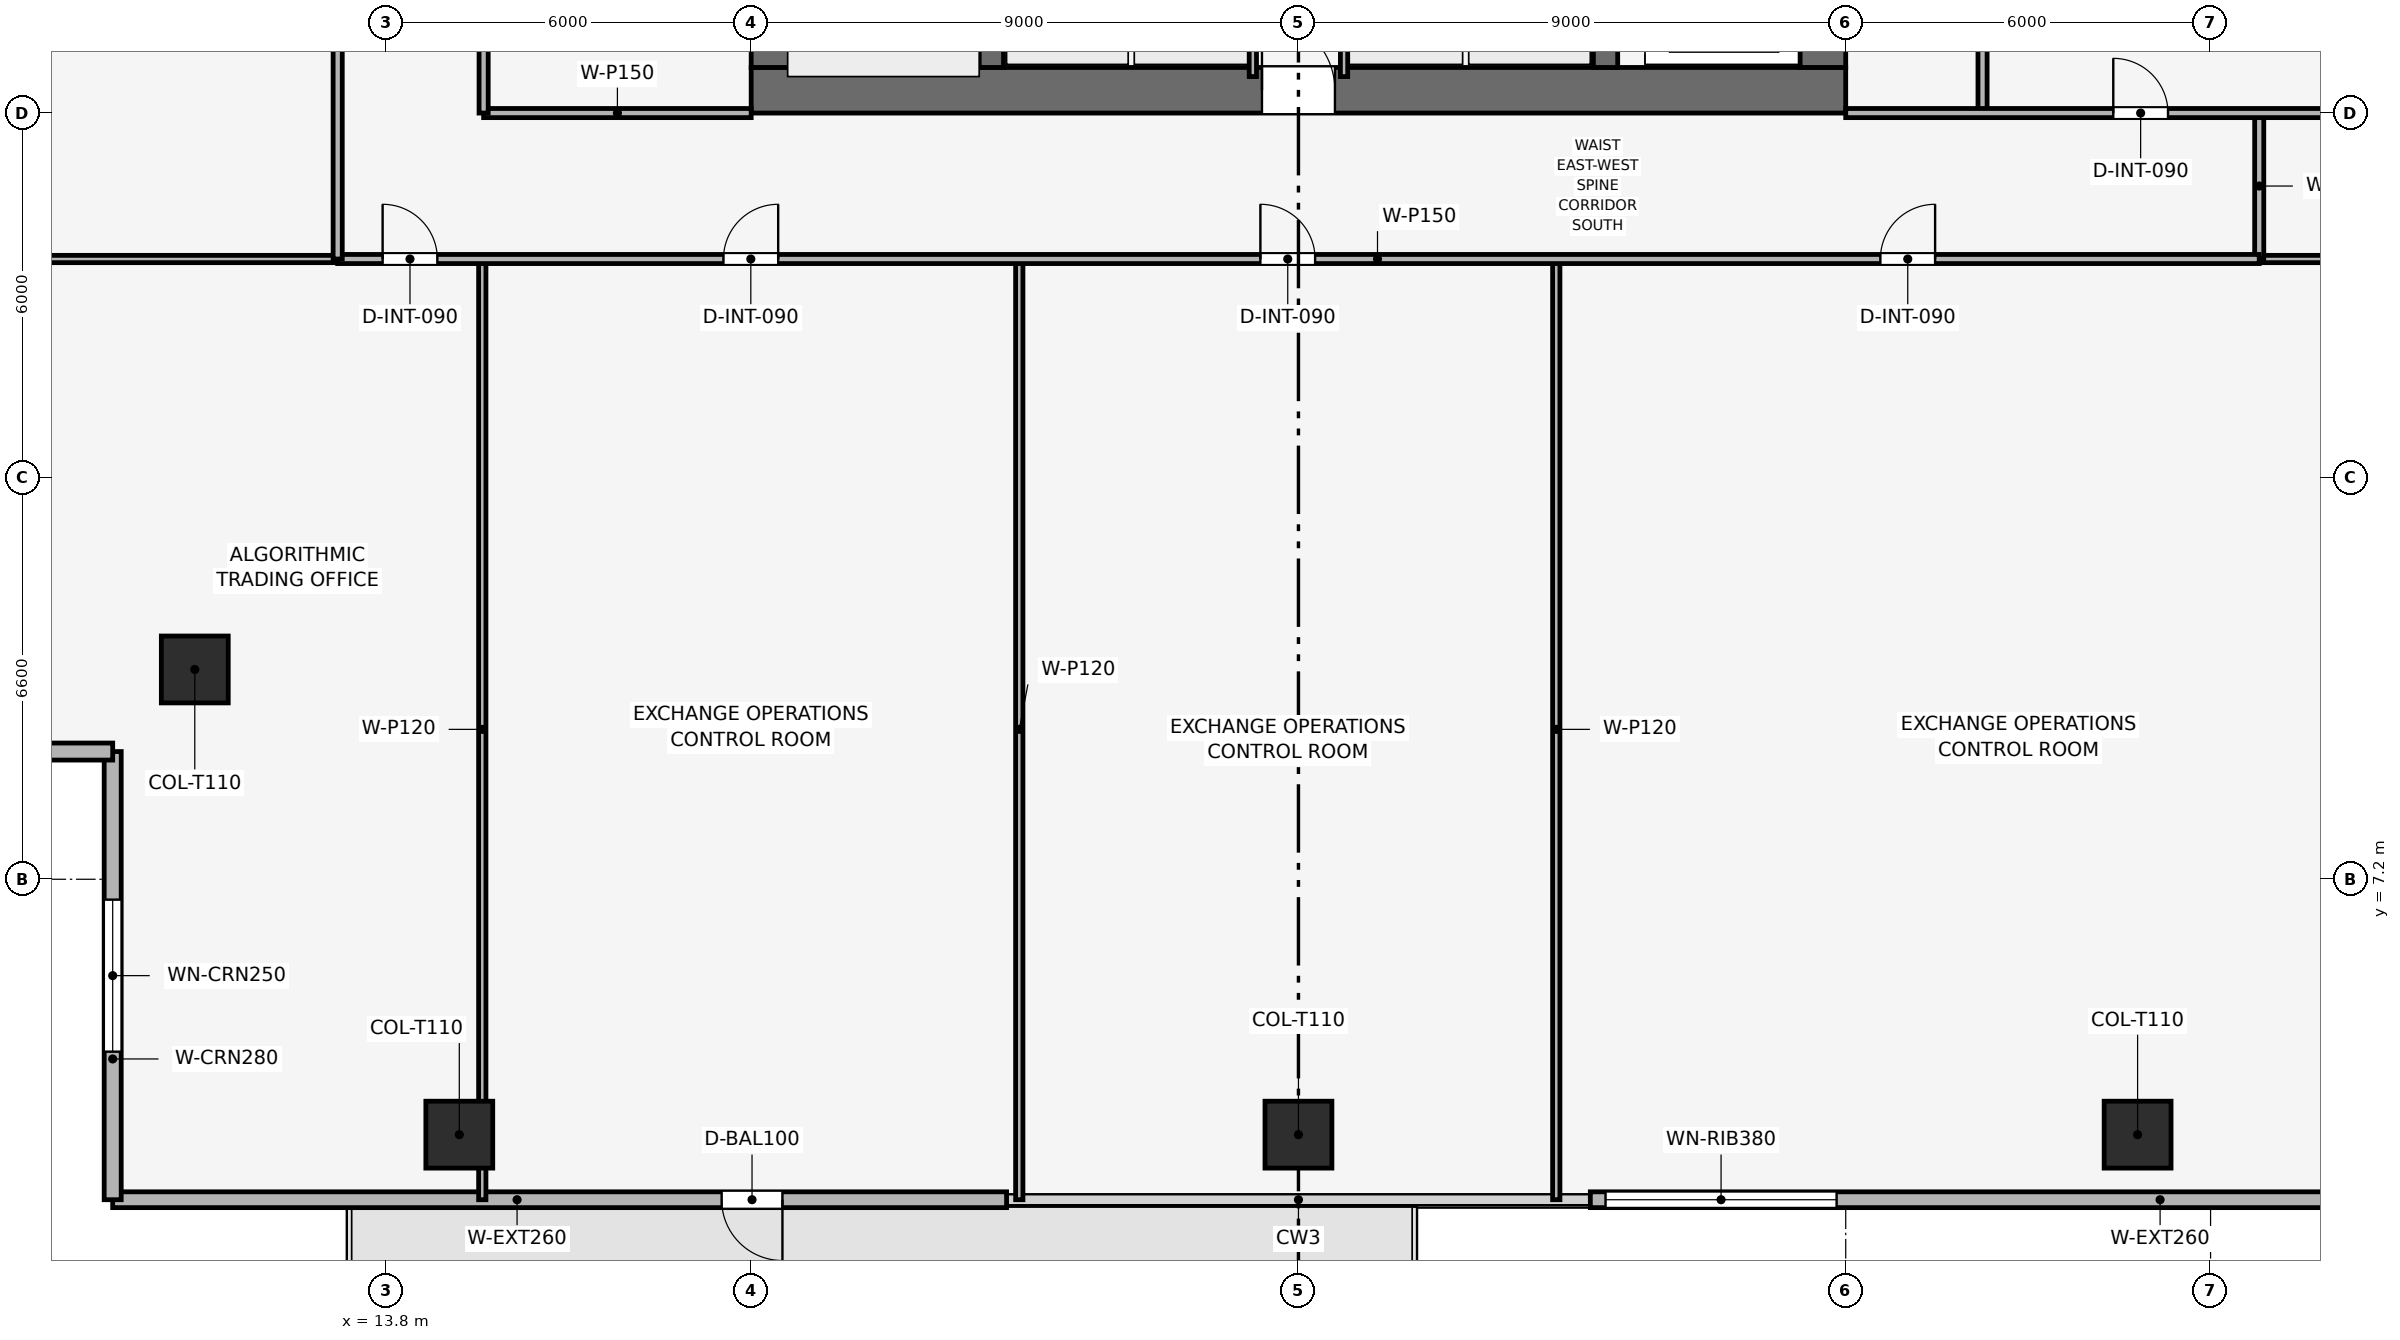
"""IFC4 building model, lengths in metres.
Left out: names, types, materials, properties, quantities, classifications, styles, units other than length and angle.
Written with IfcOpenShell. Run it as: python <this file> out.ifc"""

import sys

from ifc_helpers import new_model, si_unit, direction, frame, frame_2d, origin, origin_2d, place, context, subcontext, project, spatial, rectangle, extrude, element, fill, save


model = new_model("IFC4")
c1 = context("Model", 3, precision=1e-05, world=origin(), true_north=direction((0.0, 1.0)))
c2 = subcontext(c1, "Body", "Model", "MODEL_VIEW")
j1 = project(units=[si_unit("LENGTHUNIT", "METRE"), si_unit("PLANEANGLEUNIT", "RADIAN")], contexts=[c1])
p1 = place(None, origin())
s1 = spatial("IfcSite", under=j1, at=p1, CompositionType="ELEMENT")
p2 = place(p1, origin())
s2 = spatial("IfcBuilding", under=s1, at=p2, CompositionType="ELEMENT")
p3 = place(p2, frame((0.0, 0.0, 218.7)))
s3 = spatial("IfcBuildingStorey", under=s2, at=p3, CompositionType="ELEMENT", Elevation=218.7)
p4 = place(p3, frame((19.8, 20.175, 0.0), z_axis=(0.0, 0.0, 1.0), x_axis=(1.0, 0.0, 0.0)))
e1 = element("IfcWall", 1, at=p4, inside=s3, PredefinedType="SHEAR", context=c2, shape_type="SweptSolid", body=[
    extrude(rectangle(XDim=18.0, YDim=0.75, at=frame_2d((9.0, 0.0))), origin(), (0.0, 0.0, 1.0), 3.75),
])
p5 = place(p4, frame((8.4, 0.0, 0.0)))
e2 = element("IfcOpeningElement", 2, at=p5, cuts=e1, PredefinedType="OPENING", context=c2, shape_type="SweptSolid", body=[
    extrude(rectangle(XDim=1.2, YDim=2.2, at=frame_2d((0.6, 1.1))), frame((0.0, 0.385, 0.0), z_axis=(0.0, -1.0, 0.0), x_axis=(1.0, 0.0, 0.0)), (0.0, 0.0, 1.0), 0.77),
])
p6 = place(p3, frame((20.175, 20.55, 0.0), z_axis=(0.0, 0.0, 1.0), x_axis=(0.0, 1.0, 0.0)))
e3 = element("IfcWall", 3, at=p6, inside=s3, PredefinedType="SHEAR", context=c2, shape_type="SweptSolid", body=[
    extrude(rectangle(XDim=16.5, YDim=0.75, at=frame_2d((8.25, 0.0))), origin(), (0.0, 0.0, 1.0), 3.75),
])
p7 = place(p6, frame((10.25, 0.0, 0.0)))
e4 = element("IfcOpeningElement", 4, at=p7, cuts=e3, PredefinedType="OPENING", context=c2, shape_type="SweptSolid", body=[
    extrude(rectangle(XDim=1.1, YDim=2.15, at=frame_2d((0.55, 1.075))), frame((0.0, 0.385, 0.0), z_axis=(0.0, -1.0, 0.0), x_axis=(1.0, 0.0, 0.0)), (0.0, 0.0, 1.0), 0.77),
])
p8 = place(p3, frame((37.425, 20.55, 0.0), z_axis=(0.0, 0.0, 1.0), x_axis=(0.0, 1.0, 0.0)))
e5 = element("IfcWall", 5, at=p8, inside=s3, PredefinedType="SHEAR", context=c2, shape_type="SweptSolid", body=[
    extrude(rectangle(XDim=16.5, YDim=0.75, at=frame_2d((8.25, 0.0))), origin(), (0.0, 0.0, 1.0), 3.75),
])
p9 = place(p8, frame((4.75, 0.0, 0.0)))
e6 = element("IfcOpeningElement", 6, at=p9, cuts=e5, PredefinedType="OPENING", context=c2, shape_type="SweptSolid", body=[
    extrude(rectangle(XDim=1.1, YDim=2.15, at=frame_2d((0.55, 1.075))), frame((0.0, 0.385, 0.0), z_axis=(0.0, -1.0, 0.0), x_axis=(1.0, 0.0, 0.0)), (0.0, 0.0, 1.0), 0.77),
])
for number, where, z_axis, x_axis in (
    (7, (23.75, 20.55, 0.0), (0.0, 0.0, 1.0), (0.0, 1.0, 0.0)),
    (8, (33.85, 20.55, 0.0), (0.0, 0.0, 1.0), (0.0, 1.0, 0.0)),
):
    element("IfcWall", number, at=place(p3, frame(where, z_axis=z_axis, x_axis=x_axis)), inside=s3, PredefinedType="SHEAR", context=c2, shape_type="SweptSolid", body=[
        extrude(rectangle(XDim=16.5, YDim=0.4, at=frame_2d((8.25, 0.0))), origin(), (0.0, 0.0, 1.0), 3.75),
    ])
for number, where, z_axis, x_axis in (
    (9, (15.0, 3.0, 0.003), (0.0, 0.0, 1.0), (1.0, 0.0, 0.0)),
    (10, (28.8, 3.0, 0.003), (0.0, 0.0, 1.0), (1.0, 0.0, 0.0)),
    (11, (42.6, 3.0, 0.003), (0.0, 0.0, 1.0), (1.0, 0.0, 0.0)),
    (12, (10.65, 10.65, 0.003), (0.0, 0.0, 1.0), (1.0, 0.0, 0.0)),
):
    element("IfcColumn", number, at=place(p3, frame(where, z_axis=z_axis, x_axis=x_axis)), inside=s3, PredefinedType="COLUMN", context=c2, shape_type="SweptSolid", body=[
        extrude(rectangle(XDim=1.1, YDim=1.1, at=origin_2d()), origin(), (0.0, 0.0, 1.0), 3.494),
    ])
p10 = place(p3, frame((48.3, 1.93, 0.0), z_axis=(0.0, 0.0, 1.0), x_axis=(-1.0, 0.0, 0.0)))
e13 = element("IfcWall", 13, at=p10, inside=s3, PredefinedType="SOLIDWALL", context=c2, shape_type="SweptSolid", body=[
    extrude(rectangle(XDim=14.7, YDim=0.26, at=frame_2d((7.35, 0.0))), origin(), (0.0, 0.0, 1.0), 3.5),
])
p11 = place(p10, frame((10.65, 0.0, 0.9)))
e14 = element("IfcOpeningElement", 14, at=p11, cuts=e13, PredefinedType="OPENING", context=c2, shape_type="SweptSolid", body=[
    extrude(rectangle(XDim=3.8, YDim=1.9, at=frame_2d((1.9, 0.95))), frame((0.0, 0.14, 0.0), z_axis=(0.0, -1.0, 0.0), x_axis=(1.0, 0.0, 0.0)), (0.0, 0.0, 1.0), 0.28),
])
p12 = place(p3, frame((24.0, 1.93, 0.0), z_axis=(0.0, 0.0, 1.0), x_axis=(-1.0, 0.0, 0.0)))
e15 = element("IfcWall", 15, at=p12, inside=s3, PredefinedType="SOLIDWALL", context=c2, shape_type="SweptSolid", body=[
    extrude(rectangle(XDim=14.7, YDim=0.26, at=frame_2d((7.35, 0.0))), origin(), (0.0, 0.0, 1.0), 3.5),
])
p13 = place(p12, frame((3.686, 0.0, 0.0)))
e16 = element("IfcOpeningElement", 16, at=p13, cuts=e15, PredefinedType="OPENING", context=c2, shape_type="SweptSolid", body=[
    extrude(rectangle(XDim=1.0, YDim=2.2, at=frame_2d((0.5, 1.1))), frame((0.0, 0.14, 0.0), z_axis=(0.0, -1.0, 0.0), x_axis=(1.0, 0.0, 0.0)), (0.0, 0.0, 1.0), 0.28),
])
p14 = place(p3, frame((9.3, 1.93, 0.0), z_axis=(0.0, 0.0, 1.0), x_axis=(0.0, 1.0, 0.0)))
e17 = element("IfcWall", 17, at=p14, inside=s3, PredefinedType="SOLIDWALL", context=c2, shape_type="SweptSolid", body=[
    extrude(rectangle(XDim=7.37, YDim=0.28, at=frame_2d((3.685, 0.0))), origin(), (0.0, 0.0, 1.0), 3.5),
])
p15 = place(p14, frame((2.435, 0.0, 0.9)))
e18 = element("IfcOpeningElement", 18, at=p15, cuts=e17, PredefinedType="OPENING", context=c2, shape_type="SweptSolid", body=[
    extrude(rectangle(XDim=2.5, YDim=1.9, at=frame_2d((1.25, 0.95))), frame((0.0, 0.15, 0.0), z_axis=(0.0, -1.0, 0.0), x_axis=(1.0, 0.0, 0.0)), (0.0, 0.0, 1.0), 0.3),
])
p16 = place(p3, frame((9.3, 9.3, 0.0), z_axis=(0.0, 0.0, 1.0), x_axis=(-1.0, 0.0, 0.0)))
e19 = element("IfcWall", 19, at=p16, inside=s3, PredefinedType="SOLIDWALL", context=c2, shape_type="SweptSolid", body=[
    extrude(rectangle(XDim=7.37, YDim=0.28, at=frame_2d((3.685, 0.0))), origin(), (0.0, 0.0, 1.0), 3.5),
])
p17 = place(p16, frame((2.435, 0.0, 0.9)))
e20 = element("IfcOpeningElement", 20, at=p17, cuts=e19, PredefinedType="OPENING", context=c2, shape_type="SweptSolid", body=[
    extrude(rectangle(XDim=2.5, YDim=1.9, at=frame_2d((1.25, 0.95))), frame((0.0, 0.15, 0.0), z_axis=(0.0, -1.0, 0.0), x_axis=(1.0, 0.0, 0.0)), (0.0, 0.0, 1.0), 0.3),
])
for number, where, z_axis, x_axis in (
    (21, (28.05, 20.4, 0.0), (0.0, 0.0, 1.0), (0.0, 1.0, 0.0)),
    (22, (29.55, 20.4, 0.0), (0.0, 0.0, 1.0), (0.0, 1.0, 0.0)),
):
    element("IfcWall", number, at=place(p3, frame(where, z_axis=z_axis, x_axis=x_axis)), inside=s3, PredefinedType="PARTITIONING", context=c2, shape_type="SweptSolid", body=[
        extrude(rectangle(XDim=2.75, YDim=0.12, at=frame_2d((1.375, 0.0))), origin(), (0.0, 0.0, 1.0), 3.5),
    ])
p18 = place(p3, frame((15.4, 19.8, 0.0), z_axis=(0.0, 0.0, 1.0), x_axis=(1.0, 0.0, 0.0)))
e23 = element("IfcWall", 23, at=p18, inside=s3, PredefinedType="PARTITIONING", context=c2, shape_type="SweptSolid", body=[
    extrude(rectangle(XDim=4.4, YDim=0.15, at=frame_2d((2.2, 0.0))), origin(), (0.0, 0.0, 1.0), 3.035),
])
p19 = place(p3, frame((15.4, 19.8, 0.0), z_axis=(0.0, 0.0, 1.0), x_axis=(0.0, 1.0, 0.0)))
e24 = element("IfcWall", 24, at=p19, inside=s3, PredefinedType="PARTITIONING", context=c2, shape_type="SweptSolid", body=[
    extrude(rectangle(XDim=10.35, YDim=0.15, at=frame_2d((5.175, 0.0))), origin(), (0.0, 0.0, 1.0), 3.035),
])
p20 = place(p19, frame((1.2, 0.0, 0.0)))
e25 = element("IfcOpeningElement", 25, at=p20, cuts=e24, PredefinedType="OPENING", context=c2, shape_type="SweptSolid", body=[
    extrude(rectangle(XDim=0.9, YDim=2.1, at=frame_2d((0.45, 1.05))), frame((0.0, 0.085, 0.0), z_axis=(0.0, -1.0, 0.0), x_axis=(1.0, 0.0, 0.0)), (0.0, 0.0, 1.0), 0.17),
])
p21 = place(p19, frame((4.7, 0.0, 0.0)))
e26 = element("IfcOpeningElement", 26, at=p21, cuts=e24, PredefinedType="OPENING", context=c2, shape_type="SweptSolid", body=[
    extrude(rectangle(XDim=0.9, YDim=2.1, at=frame_2d((0.45, 1.05))), frame((0.0, 0.085, 0.0), z_axis=(0.0, -1.0, 0.0), x_axis=(1.0, 0.0, 0.0)), (0.0, 0.0, 1.0), 0.17),
])
p22 = place(p19, frame((8.1, 0.0, 0.0)))
e27 = element("IfcOpeningElement", 27, at=p22, cuts=e24, PredefinedType="OPENING", context=c2, shape_type="SweptSolid", body=[
    extrude(rectangle(XDim=0.95, YDim=2.1, at=frame_2d((0.475, 1.05))), frame((0.0, 0.085, 0.0), z_axis=(0.0, -1.0, 0.0), x_axis=(1.0, 0.0, 0.0)), (0.0, 0.0, 1.0), 0.17),
])
p23 = place(p3, frame((40.05, 19.8, 0.0), z_axis=(0.0, 0.0, 1.0), x_axis=(0.0, 1.0, 0.0)))
e28 = element("IfcWall", 28, at=p23, inside=s3, PredefinedType="PARTITIONING", context=c2, shape_type="SweptSolid", body=[
    extrude(rectangle(XDim=7.05, YDim=0.15, at=frame_2d((3.525, 0.0))), origin(), (0.0, 0.0, 1.0), 3.035),
])
for number, where, z_axis, x_axis in (
    (29, (15.378, 1.93, 0.0), (0.0, 0.0, 1.0), (0.0, 1.0, 0.0)),
    (30, (24.209, 1.93, 0.0), (0.0, 0.0, 1.0), (0.0, 1.0, 0.0)),
    (31, (33.04, 1.93, 0.0), (0.0, 0.0, 1.0), (0.0, 1.0, 0.0)),
):
    element("IfcWall", number, at=place(p3, frame(where, z_axis=z_axis, x_axis=x_axis)), inside=s3, PredefinedType="PARTITIONING", context=c2, shape_type="SweptSolid", body=[
        extrude(rectangle(XDim=15.47, YDim=0.12, at=frame_2d((7.735, 0.0))), origin(), (0.0, 0.0, 1.0), 2.885),
    ])
p24 = place(p3, frame((1.93, 17.4, 0.0), z_axis=(0.0, 0.0, 1.0), x_axis=(1.0, 0.0, 0.0)))
e32 = element("IfcWall", 32, at=p24, inside=s3, PredefinedType="PARTITIONING", context=c2, shape_type="SweptSolid", body=[
    extrude(rectangle(XDim=11.07, YDim=0.12, at=frame_2d((5.535, 0.0))), origin(), (0.0, 0.0, 1.0), 2.885),
])
p25 = place(p3, frame((44.6, 17.4, 0.0), z_axis=(0.0, 0.0, 1.0), x_axis=(1.0, 0.0, 0.0)))
e33 = element("IfcWall", 33, at=p25, inside=s3, PredefinedType="PARTITIONING", context=c2, shape_type="SweptSolid", body=[
    extrude(rectangle(XDim=11.07, YDim=0.12, at=frame_2d((5.535, 0.0))), origin(), (0.0, 0.0, 1.0), 2.885),
])
p26 = place(p3, frame((44.6, 17.4, 0.0), z_axis=(0.0, 0.0, 1.0), x_axis=(0.0, 1.0, 0.0)))
e34 = element("IfcWall", 34, at=p26, inside=s3, PredefinedType="PARTITIONING", context=c2, shape_type="SweptSolid", body=[
    extrude(rectangle(XDim=2.4, YDim=0.15, at=frame_2d((1.2, 0.0))), origin(), (0.0, 0.0, 1.0), 3.5),
])
p27 = place(p3, frame((37.8, 19.8, 0.0), z_axis=(0.0, 0.0, 1.0), x_axis=(1.0, 0.0, 0.0)))
e35 = element("IfcWall", 35, at=p27, inside=s3, PredefinedType="PARTITIONING", context=c2, shape_type="SweptSolid", body=[
    extrude(rectangle(XDim=17.87, YDim=0.15, at=frame_2d((8.935, 0.0))), origin(), (0.0, 0.0, 1.0), 2.885),
])
p28 = place(p27, frame((4.4, 0.0, 0.0)))
e36 = element("IfcOpeningElement", 36, at=p28, cuts=e35, PredefinedType="OPENING", context=c2, shape_type="SweptSolid", body=[
    extrude(rectangle(XDim=0.9, YDim=2.1, at=frame_2d((0.45, 1.05))), frame((0.0, 0.085, 0.0), z_axis=(0.0, -1.0, 0.0), x_axis=(1.0, 0.0, 0.0)), (0.0, 0.0, 1.0), 0.17),
])
p29 = place(p3, frame((13.0, 17.4, 0.0), z_axis=(0.0, 0.0, 1.0), x_axis=(1.0, 0.0, 0.0)))
e37 = element("IfcWall", 37, at=p29, inside=s3, PredefinedType="PARTITIONING", context=c2, shape_type="SweptSolid", body=[
    extrude(rectangle(XDim=31.6, YDim=0.15, at=frame_2d((15.8, 0.0))), origin(), (0.0, 0.0, 1.0), 3.035),
])
p30 = place(p29, frame((0.739, 0.0, 0.0)))
e38 = element("IfcOpeningElement", 38, at=p30, cuts=e37, PredefinedType="OPENING", context=c2, shape_type="SweptSolid", body=[
    extrude(rectangle(XDim=0.9, YDim=2.1, at=frame_2d((0.45, 1.05))), frame((0.0, 0.085, 0.0), z_axis=(0.0, -1.0, 0.0), x_axis=(1.0, 0.0, 0.0)), (0.0, 0.0, 1.0), 0.17),
])
p31 = place(p29, frame((6.344, 0.0, 0.0)))
e39 = element("IfcOpeningElement", 39, at=p31, cuts=e37, PredefinedType="OPENING", context=c2, shape_type="SweptSolid", body=[
    extrude(rectangle(XDim=0.9, YDim=2.1, at=frame_2d((0.45, 1.05))), frame((0.0, 0.085, 0.0), z_axis=(0.0, -1.0, 0.0), x_axis=(1.0, 0.0, 0.0)), (0.0, 0.0, 1.0), 0.17),
])
p32 = place(p29, frame((15.174, 0.0, 0.0)))
e40 = element("IfcOpeningElement", 40, at=p32, cuts=e37, PredefinedType="OPENING", context=c2, shape_type="SweptSolid", body=[
    extrude(rectangle(XDim=0.9, YDim=2.1, at=frame_2d((0.45, 1.05))), frame((0.0, 0.085, 0.0), z_axis=(0.0, -1.0, 0.0), x_axis=(1.0, 0.0, 0.0)), (0.0, 0.0, 1.0), 0.17),
])
p33 = place(p29, frame((25.37, 0.0, 0.0)))
e41 = element("IfcOpeningElement", 41, at=p33, cuts=e37, PredefinedType="OPENING", context=c2, shape_type="SweptSolid", body=[
    extrude(rectangle(XDim=0.9, YDim=2.1, at=frame_2d((0.45, 1.05))), frame((0.0, 0.085, 0.0), z_axis=(0.0, -1.0, 0.0), x_axis=(1.0, 0.0, 0.0)), (0.0, 0.0, 1.0), 0.17),
])
p34 = place(p3, frame((13.0, 17.4, 0.0), z_axis=(0.0, 0.0, 1.0), x_axis=(0.0, 1.0, 0.0)))
e42 = element("IfcWall", 42, at=p34, inside=s3, PredefinedType="PARTITIONING", context=c2, shape_type="SweptSolid", body=[
    extrude(rectangle(XDim=22.8, YDim=0.15, at=frame_2d((11.4, 0.0))), origin(), (0.0, 0.0, 1.0), 3.035),
])
p35 = place(p34, frame((4.641, 0.0, 0.0)))
e43 = element("IfcOpeningElement", 43, at=p35, cuts=e42, PredefinedType="OPENING", context=c2, shape_type="SweptSolid", body=[
    extrude(rectangle(XDim=0.9, YDim=2.1, at=frame_2d((0.45, 1.05))), frame((0.0, 0.085, 0.0), z_axis=(0.0, -1.0, 0.0), x_axis=(1.0, 0.0, 0.0)), (0.0, 0.0, 1.0), 0.17),
])
p36 = place(p34, frame((13.641, 0.0, 0.0)))
e44 = element("IfcOpeningElement", 44, at=p36, cuts=e42, PredefinedType="OPENING", context=c2, shape_type="SweptSolid", body=[
    extrude(rectangle(XDim=0.9, YDim=2.1, at=frame_2d((0.45, 1.05))), frame((0.0, 0.085, 0.0), z_axis=(0.0, -1.0, 0.0), x_axis=(1.0, 0.0, 0.0)), (0.0, 0.0, 1.0), 0.17),
])
p37 = place(p13, origin())
e45 = element("IfcDoor", 45, at=p37, inside=s3, OperationType="SINGLE_SWING_LEFT", PredefinedType="DOOR", context=c2, shape_type="SweptSolid", body=[
    extrude(rectangle(XDim=1.0, YDim=2.2, at=frame_2d((0.5, 1.1))), frame((0.0, 0.025, 0.0), z_axis=(0.0, -1.0, 0.0), x_axis=(1.0, 0.0, 0.0)), (0.0, 0.0, 1.0), 0.05),
])
fill(e16, e45)
p38 = place(p11, origin())
e46 = element("IfcWindow", 46, at=p38, inside=s3, PartitioningType="SINGLE_PANEL", PredefinedType="WINDOW", context=c2, shape_type="SweptSolid", body=[
    extrude(rectangle(XDim=3.8, YDim=1.9, at=frame_2d((1.9, 0.95))), frame((0.0, 0.03, 0.0), z_axis=(0.0, -1.0, 0.0), x_axis=(1.0, 0.0, 0.0)), (0.0, 0.0, 1.0), 0.06),
])
fill(e14, e46)
p39 = place(p15, origin())
e47 = element("IfcWindow", 47, at=p39, inside=s3, PartitioningType="SINGLE_PANEL", PredefinedType="WINDOW", context=c2, shape_type="SweptSolid", body=[
    extrude(rectangle(XDim=2.5, YDim=1.9, at=frame_2d((1.25, 0.95))), frame((0.0, 0.03, 0.0), z_axis=(0.0, -1.0, 0.0), x_axis=(1.0, 0.0, 0.0)), (0.0, 0.0, 1.0), 0.06),
])
fill(e18, e47)
p40 = place(p28, origin())
e48 = element("IfcDoor", 48, at=p40, inside=s3, OperationType="SINGLE_SWING_LEFT", PredefinedType="DOOR", context=c2, shape_type="SweptSolid", body=[
    extrude(rectangle(XDim=0.9, YDim=2.1, at=frame_2d((0.45, 1.05))), frame((0.0, 0.025, 0.0), z_axis=(0.0, -1.0, 0.0), x_axis=(1.0, 0.0, 0.0)), (0.0, 0.0, 1.0), 0.05),
])
fill(e36, e48)
p41 = place(p30, origin())
e49 = element("IfcDoor", 49, at=p41, inside=s3, OperationType="SINGLE_SWING_LEFT", PredefinedType="DOOR", context=c2, shape_type="SweptSolid", body=[
    extrude(rectangle(XDim=0.9, YDim=2.1, at=frame_2d((0.45, 1.05))), frame((0.0, 0.025, 0.0), z_axis=(0.0, -1.0, 0.0), x_axis=(1.0, 0.0, 0.0)), (0.0, 0.0, 1.0), 0.05),
])
fill(e38, e49)
p42 = place(p31, origin())
e50 = element("IfcDoor", 50, at=p42, inside=s3, OperationType="SINGLE_SWING_RIGHT", PredefinedType="DOOR", context=c2, shape_type="SweptSolid", body=[
    extrude(rectangle(XDim=0.9, YDim=2.1, at=frame_2d((0.45, 1.05))), frame((0.0, 0.025, 0.0), z_axis=(0.0, -1.0, 0.0), x_axis=(1.0, 0.0, 0.0)), (0.0, 0.0, 1.0), 0.05),
])
fill(e39, e50)
p43 = place(p32, origin())
e51 = element("IfcDoor", 51, at=p43, inside=s3, OperationType="SINGLE_SWING_LEFT", PredefinedType="DOOR", context=c2, shape_type="SweptSolid", body=[
    extrude(rectangle(XDim=0.9, YDim=2.1, at=frame_2d((0.45, 1.05))), frame((0.0, 0.025, 0.0), z_axis=(0.0, -1.0, 0.0), x_axis=(1.0, 0.0, 0.0)), (0.0, 0.0, 1.0), 0.05),
])
fill(e40, e51)
p44 = place(p33, origin())
e52 = element("IfcDoor", 52, at=p44, inside=s3, OperationType="SINGLE_SWING_RIGHT", PredefinedType="DOOR", context=c2, shape_type="SweptSolid", body=[
    extrude(rectangle(XDim=0.9, YDim=2.1, at=frame_2d((0.45, 1.05))), frame((0.0, 0.025, 0.0), z_axis=(0.0, -1.0, 0.0), x_axis=(1.0, 0.0, 0.0)), (0.0, 0.0, 1.0), 0.05),
])
fill(e41, e52)
p45 = place(p5, origin())
e53 = element("IfcDoor", 53, at=p45, inside=s3, OperationType="SINGLE_SWING_LEFT", PredefinedType="DOOR", context=c2, shape_type="SweptSolid", body=[
    extrude(rectangle(XDim=1.2, YDim=2.2, at=frame_2d((0.6, 1.1))), frame((0.0, 0.025, 0.0), z_axis=(0.0, -1.0, 0.0), x_axis=(1.0, 0.0, 0.0)), (0.0, 0.0, 1.0), 0.05),
])
fill(e2, e53)
save(model, sys.argv[1])
